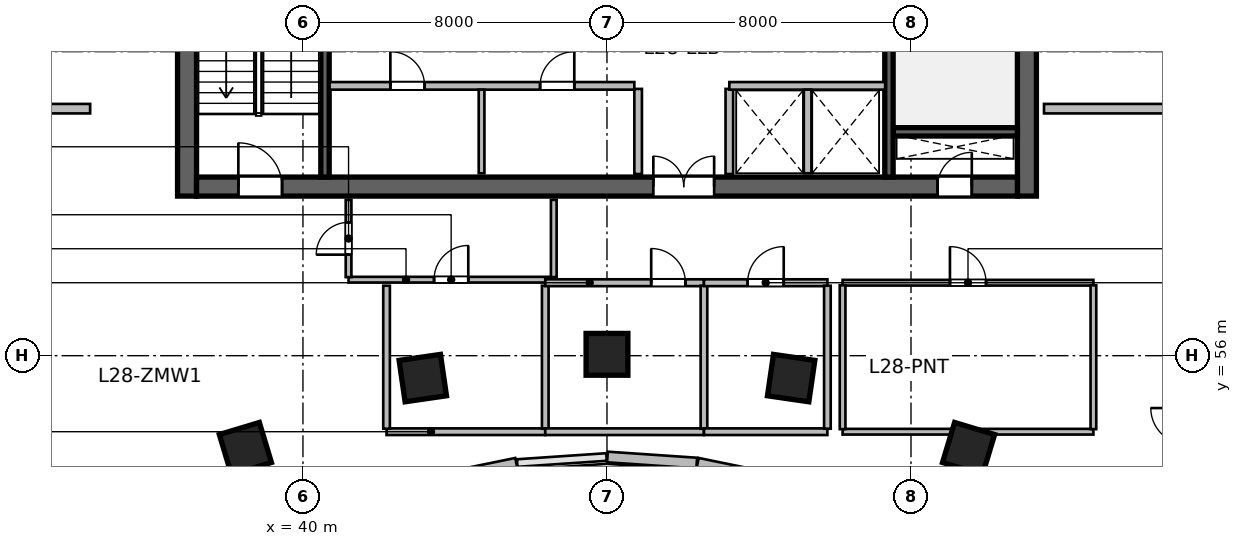
"""IFC4 building model, lengths in metres.
Left out: names, types, materials, properties, quantities, classifications, styles, units other than length and angle.
Written with IfcOpenShell. Run it as: python <this file> out.ifc"""

import sys

from ifc_helpers import new_model, si_unit, direction, frame, frame_2d, origin, origin_2d, place, context, subcontext, project, spatial, rectangle, extrude, source, transform, mapped, element, fill, save


model = new_model("IFC4")
c1 = context("Model", 3, precision=1e-05, world=origin(), true_north=direction((0.0, 1.0)))
c2 = subcontext(c1, "Body", "Model", "MODEL_VIEW")
j1 = project(units=[si_unit("LENGTHUNIT", "METRE"), si_unit("PLANEANGLEUNIT", "RADIAN")], contexts=[c1])
p1 = place(None, origin())
s1 = spatial("IfcSite", under=j1, at=p1, CompositionType="ELEMENT")
p2 = place(p1, origin())
s2 = spatial("IfcBuilding", under=s1, at=p2, CompositionType="ELEMENT")
p3 = place(p2, frame((0.0, 0.0, 119.4)))
s3 = spatial("IfcBuildingStorey", under=s2, at=p3, CompositionType="ELEMENT", Elevation=119.4)
m1 = source(origin(), c2, "Body", "SweptSolid", [
    extrude(rectangle(XDim=12.0, YDim=0.5, at=frame_2d((6.0, 0.0))), origin(), (0.0, 0.0, 1.0), 3.9),
])
for number, where, z_axis, x_axis in (
    (1, (36.95, 60.2, 0.0), (0.0, 0.0, 1.0), (0.0, 1.0, 0.0)),
    (2, (59.05, 60.2, 0.0), (0.0, 0.0, 1.0), (0.0, 1.0, 0.0)),
):
    element("IfcWall", number, at=place(p3, frame(where, z_axis=z_axis, x_axis=x_axis)), inside=s3, PredefinedType="SHEAR", context=c2, shape_type="MappedRepresentation", body=[
        mapped(m1, transform((0.0, 0.0, 0.0), scale=1.0)),
    ])
m2 = source(origin(), c2, "Body", "SweptSolid", [
    extrude(rectangle(XDim=21.6, YDim=0.5, at=frame_2d((10.8, 0.0))), origin(), (0.0, 0.0, 1.0), 3.9),
])
p4 = place(p3, frame((37.2, 60.45, 0.0), z_axis=(0.0, 0.0, 1.0), x_axis=(1.0, 0.0, 0.0)))
e3 = element("IfcWall", 3, at=p4, inside=s3, PredefinedType="SHEAR", context=c2, shape_type="MappedRepresentation", body=[
    mapped(m2, transform((0.0, 0.0, 0.0), scale=1.0)),
])
p5 = place(p4, frame((1.1, 0.0, 0.0)))
e4 = element("IfcOpeningElement", 4, at=p5, cuts=e3, PredefinedType="OPENING", context=c2, shape_type="SweptSolid", body=[
    extrude(rectangle(XDim=1.15, YDim=2.15, at=frame_2d((0.575, 1.075))), frame((0.0, 0.26, 0.0), z_axis=(0.0, -1.0, 0.0), x_axis=(1.0, 0.0, 0.0)), (0.0, 0.0, 1.0), 0.52),
])
p6 = place(p4, frame((19.5, 0.0, 0.0)))
e5 = element("IfcOpeningElement", 5, at=p6, cuts=e3, PredefinedType="OPENING", context=c2, shape_type="SweptSolid", body=[
    extrude(rectangle(XDim=0.9, YDim=2.1, at=frame_2d((0.45, 1.05))), frame((0.0, 0.26, 0.0), z_axis=(0.0, -1.0, 0.0), x_axis=(1.0, 0.0, 0.0)), (0.0, 0.0, 1.0), 0.52),
])
p7 = place(p4, frame((12.02, 0.0, 0.0)))
e6 = element("IfcOpeningElement", 6, at=p7, cuts=e3, PredefinedType="OPENING", context=c2, shape_type="SweptSolid", body=[
    extrude(rectangle(XDim=1.6, YDim=2.15, at=frame_2d((0.8, 1.075))), frame((0.0, 0.26, 0.0), z_axis=(0.0, -1.0, 0.0), x_axis=(1.0, 0.0, 0.0)), (0.0, 0.0, 1.0), 0.52),
])
m3 = source(origin(), c2, "Body", "SweptSolid", [
    extrude(rectangle(XDim=3.27, YDim=0.22, at=frame_2d((1.635, 0.0))), origin(), (0.0, 0.0, 1.0), 3.9),
])
p8 = place(p3, frame((55.53, 61.89, 0.0), z_axis=(0.0, 0.0, 1.0), x_axis=(1.0, 0.0, 0.0)))
e7 = element("IfcWall", 7, at=p8, inside=s3, PredefinedType="SHEAR", context=c2, shape_type="MappedRepresentation", body=[
    mapped(m3, transform((0.0, 0.0, 0.0), scale=1.0)),
])
m4 = source(origin(), c2, "Body", "SweptSolid", [
    extrude(rectangle(XDim=11.0, YDim=0.22, at=frame_2d((5.5, 0.0))), origin(), (0.0, 0.0, 1.0), 3.9),
])
p9 = place(p3, frame((40.58, 60.7, 0.0), z_axis=(0.0, 0.0, 1.0), x_axis=(0.0, 1.0, 0.0)))
e8 = element("IfcWall", 8, at=p9, inside=s3, PredefinedType="SHEAR", context=c2, shape_type="MappedRepresentation", body=[
    mapped(m4, transform((0.0, 0.0, 0.0), scale=1.0)),
])
p10 = place(p3, frame((55.42, 60.7, 0.0), z_axis=(0.0, 0.0, 1.0), x_axis=(0.0, 1.0, 0.0)))
e9 = element("IfcWall", 9, at=p10, inside=s3, PredefinedType="SHEAR", context=c2, shape_type="MappedRepresentation", body=[
    mapped(m4, transform((0.0, 0.0, 0.0), scale=1.0)),
])
p11 = place(p10, frame((9.545, 0.0, 0.0)))
e10 = element("IfcOpeningElement", 10, at=p11, cuts=e9, PredefinedType="OPENING", context=c2, shape_type="SweptSolid", body=[
    extrude(rectangle(XDim=1.15, YDim=2.15, at=frame_2d((0.575, 1.075))), frame((0.0, 0.12, 0.0), z_axis=(0.0, -1.0, 0.0), x_axis=(1.0, 0.0, 0.0)), (0.0, 0.0, 1.0), 0.24),
])
m5 = source(origin(), c2, "Body", "SweptSolid", [
    extrude(rectangle(XDim=1.1, YDim=1.1, at=origin_2d()), origin(), (0.0, 0.0, 1.0), 3.9),
])
for number, where, z_axis, x_axis in (
    (11, (38.485, 53.558, 0.0), (0.0, 0.0, 1.0), (-0.289, 0.957, 0.0)),
    (12, (43.154, 55.411, 0.0), (0.0, 0.0, 1.0), (-0.143, 0.99, 0.0)),
    (13, (48.0, 56.036, 0.0), (0.0, 0.0, 1.0), (0.0, 1.0, 0.0)),
    (14, (52.846, 55.411, 0.0), (0.0, 0.0, 1.0), (0.143, 0.99, 0.0)),
    (15, (57.515, 53.558, 0.0), (0.0, 0.0, 1.0), (0.289, 0.957, 0.0)),
):
    element("IfcColumn", number, at=place(p3, frame(where, z_axis=z_axis, x_axis=x_axis)), inside=s3, PredefinedType="COLUMN", context=c2, shape_type="MappedRepresentation", body=[
        mapped(m5, transform((0.0, 0.0, 0.0), scale=1.0)),
    ])
m6 = source(origin(), c2, "Body", "SweptSolid", [
    extrude(rectangle(XDim=2.374, YDim=0.28, at=frame_2d((1.187, 0.0))), origin(), (0.0, 0.0, 1.0), 3.65),
])
p12 = place(p3, frame((52.711, 52.695, 0.0), z_axis=(0.0, 0.0, 1.0), x_axis=(-0.979619827472, 0.200860632341, 0.0)))
e16 = element("IfcWall", 16, at=p12, inside=s3, PredefinedType="SOLIDWALL", context=c2, shape_type="MappedRepresentation", body=[
    mapped(m6, transform((0.0, 0.0, 0.0), scale=1.0)),
])
m7 = source(origin(), c2, "Body", "SweptSolid", [
    extrude(rectangle(XDim=2.355, YDim=0.28, at=frame_2d((1.177, 0.0))), origin(), (0.0, 0.0, 1.0), 3.65),
])
p13 = place(p3, frame((50.362, 53.175, 0.0), z_axis=(0.0, 0.0, 1.0), x_axis=(-0.997699017577, 0.067798748701, 0.0)))
e17 = element("IfcWall", 17, at=p13, inside=s3, PredefinedType="SOLIDWALL", context=c2, shape_type="MappedRepresentation", body=[
    mapped(m7, transform((0.0, 0.0, 0.0), scale=1.0)),
])
p14 = place(p3, frame((45.614, 53.172, 0.0), z_axis=(0.0, 0.0, 1.0), x_axis=(-0.979619827472, -0.200860632341, 0.0)))
e18 = element("IfcWall", 18, at=p14, inside=s3, PredefinedType="SOLIDWALL", context=c2, shape_type="MappedRepresentation", body=[
    mapped(m6, transform((0.0, 0.0, 0.0), scale=1.0)),
])
m8 = source(origin(), c2, "Body", "SweptSolid", [
    extrude(rectangle(XDim=2.24, YDim=0.2, at=frame_2d((1.12, 0.0))), origin(), (0.0, 0.0, 1.0), 3.65),
])
for number, where, z_axis, x_axis in (
    (19, (48.82, 60.78, 0.0), (0.0, 0.0, 1.0), (0.0, 1.0, 0.0)),
    (20, (51.22, 60.78, 0.0), (0.0, 0.0, 1.0), (0.0, 1.0, 0.0)),
):
    element("IfcWall", number, at=place(p3, frame(where, z_axis=z_axis, x_axis=x_axis)), inside=s3, PredefinedType="SOLIDWALL", context=c2, shape_type="MappedRepresentation", body=[
        mapped(m8, transform((0.0, 0.0, 0.0), scale=1.0)),
    ])
m9 = source(origin(), c2, "Body", "SweptSolid", [
    extrude(rectangle(XDim=8.02, YDim=0.2, at=frame_2d((4.01, 0.0))), origin(), (0.0, 0.0, 1.0), 3.65),
])
p15 = place(p3, frame((40.7, 63.1, 0.0), z_axis=(0.0, 0.0, 1.0), x_axis=(1.0, 0.0, 0.0)))
e21 = element("IfcWall", 21, at=p15, inside=s3, PredefinedType="SOLIDWALL", context=c2, shape_type="MappedRepresentation", body=[
    mapped(m9, transform((0.0, 0.0, 0.0), scale=1.0)),
])
p16 = place(p15, frame((1.6, 0.0, 0.0)))
e22 = element("IfcOpeningElement", 22, at=p16, cuts=e21, PredefinedType="OPENING", context=c2, shape_type="SweptSolid", body=[
    extrude(rectangle(XDim=0.9, YDim=2.1, at=frame_2d((0.45, 1.05))), frame((0.0, 0.11, 0.0), z_axis=(0.0, -1.0, 0.0), x_axis=(1.0, 0.0, 0.0)), (0.0, 0.0, 1.0), 0.22),
])
p17 = place(p15, frame((5.54, 0.0, 0.0)))
e23 = element("IfcOpeningElement", 23, at=p17, cuts=e21, PredefinedType="OPENING", context=c2, shape_type="SweptSolid", body=[
    extrude(rectangle(XDim=0.9, YDim=2.1, at=frame_2d((0.45, 1.05))), frame((0.0, 0.11, 0.0), z_axis=(0.0, -1.0, 0.0), x_axis=(1.0, 0.0, 0.0)), (0.0, 0.0, 1.0), 0.22),
])
m10 = source(origin(), c2, "Body", "SweptSolid", [
    extrude(rectangle(XDim=4.1, YDim=0.2, at=frame_2d((2.05, 0.0))), origin(), (0.0, 0.0, 1.0), 3.65),
])
p18 = place(p3, frame((51.22, 63.1, 0.0), z_axis=(0.0, 0.0, 1.0), x_axis=(1.0, 0.0, 0.0)))
e24 = element("IfcWall", 24, at=p18, inside=s3, PredefinedType="SOLIDWALL", context=c2, shape_type="MappedRepresentation", body=[
    mapped(m10, transform((0.0, 0.0, 0.0), scale=1.0)),
])
m11 = source(origin(), c2, "Body", "SweptSolid", [
    extrude(rectangle(XDim=2.2, YDim=0.15, at=frame_2d((1.1, 0.0))), origin(), (0.0, 0.0, 1.0), 3.65),
])
p19 = place(p3, frame((44.7, 60.8, 0.0), z_axis=(0.0, 0.0, 1.0), x_axis=(0.0, 1.0, 0.0)))
e25 = element("IfcWall", 25, at=p19, inside=s3, PredefinedType="PARTITIONING", context=c2, shape_type="MappedRepresentation", body=[
    mapped(m11, transform((0.0, 0.0, 0.0), scale=1.0)),
])
m12 = source(origin(), c2, "Body", "SweptSolid", [
    extrude(rectangle(XDim=2.2, YDim=0.2, at=frame_2d((1.1, 0.0))), origin(), (0.0, 0.0, 1.0), 3.65),
])
p20 = place(p3, frame((53.28, 60.8, 0.0), z_axis=(0.0, 0.0, 1.0), x_axis=(0.0, 1.0, 0.0)))
e26 = element("IfcWall", 26, at=p20, inside=s3, PredefinedType="SOLIDWALL", context=c2, shape_type="MappedRepresentation", body=[
    mapped(m12, transform((0.0, 0.0, 0.0), scale=1.0)),
])
m13 = source(origin(), c2, "Body", "SweptSolid", [
    extrude(rectangle(XDim=5.4, YDim=0.15, at=frame_2d((2.7, 0.0))), origin(), (0.0, 0.0, 1.0), 3.65),
])
p21 = place(p3, frame((41.2, 58.0, 0.0), z_axis=(0.0, 0.0, 1.0), x_axis=(1.0, 0.0, 0.0)))
e27 = element("IfcWall", 27, at=p21, inside=s3, PredefinedType="PARTITIONING", context=c2, shape_type="MappedRepresentation", body=[
    mapped(m13, transform((0.0, 0.0, 0.0), scale=1.0)),
])
p22 = place(p21, frame((2.25, 0.0, 0.0)))
e28 = element("IfcOpeningElement", 28, at=p22, cuts=e27, PredefinedType="OPENING", context=c2, shape_type="SweptSolid", body=[
    extrude(rectangle(XDim=0.9, YDim=2.08, at=frame_2d((0.45, 1.04))), frame((0.0, 0.085, 0.0), z_axis=(0.0, -1.0, 0.0), x_axis=(1.0, 0.0, 0.0)), (0.0, 0.0, 1.0), 0.17),
])
m14 = source(origin(), c2, "Body", "SweptSolid", [
    extrude(rectangle(XDim=2.033, YDim=0.15, at=frame_2d((1.016, 0.0))), origin(), (0.0, 0.0, 1.0), 3.65),
])
p23 = place(p3, frame((41.2, 58.067, 0.0), z_axis=(0.0, 0.0, 1.0), x_axis=(0.0, 1.0, 0.0)))
e29 = element("IfcWall", 29, at=p23, inside=s3, PredefinedType="PARTITIONING", context=c2, shape_type="MappedRepresentation", body=[
    mapped(m14, transform((0.0, 0.0, 0.0), scale=1.0)),
])
p24 = place(p23, frame((0.591, 0.0, 0.0)))
e30 = element("IfcOpeningElement", 30, at=p24, cuts=e29, PredefinedType="OPENING", context=c2, shape_type="SweptSolid", body=[
    extrude(rectangle(XDim=0.85, YDim=2.1, at=frame_2d((0.425, 1.05))), frame((0.0, 0.085, 0.0), z_axis=(0.0, -1.0, 0.0), x_axis=(1.0, 0.0, 0.0)), (0.0, 0.0, 1.0), 0.17),
])
p25 = place(p3, frame((46.6, 58.067, 0.0), z_axis=(0.0, 0.0, 1.0), x_axis=(0.0, 1.0, 0.0)))
e31 = element("IfcWall", 31, at=p25, inside=s3, PredefinedType="PARTITIONING", context=c2, shape_type="MappedRepresentation", body=[
    mapped(m14, transform((0.0, 0.0, 0.0), scale=1.0)),
])
m15 = source(origin(), c2, "Body", "SweptSolid", [
    extrude(rectangle(XDim=4.176, YDim=0.175, at=frame_2d((2.088, 0.0))), origin(), (0.0, 0.0, 1.0), 3.65),
])
p26 = place(p3, frame((42.2, 54.0, 0.0), z_axis=(0.0, 0.0, 1.0), x_axis=(1.0, 0.0, 0.0)))
e32 = element("IfcWall", 32, at=p26, inside=s3, PredefinedType="PARTITIONING", context=c2, shape_type="MappedRepresentation", body=[
    mapped(m15, transform((0.0, 0.0, 0.0), scale=1.0)),
])
m16 = source(origin(), c2, "Body", "SweptSolid", [
    extrude(rectangle(XDim=3.763, YDim=0.175, at=frame_2d((1.881, 0.0))), origin(), (0.0, 0.0, 1.0), 3.65),
])
for number, where, z_axis, x_axis in (
    (33, (42.2, 54.079, 0.0), (0.0, 0.0, 1.0), (0.0, 1.0, 0.0)),
    (34, (46.376, 54.079, 0.0), (0.0, 0.0, 1.0), (0.0, 1.0, 0.0)),
):
    element("IfcWall", number, at=place(p3, frame(where, z_axis=z_axis, x_axis=x_axis)), inside=s3, PredefinedType="PARTITIONING", context=c2, shape_type="MappedRepresentation", body=[
        mapped(m16, transform((0.0, 0.0, 0.0), scale=1.0)),
    ])
p27 = place(p3, frame((46.376, 54.0, 0.0), z_axis=(0.0, 0.0, 1.0), x_axis=(1.0, 0.0, 0.0)))
e35 = element("IfcWall", 35, at=p27, inside=s3, PredefinedType="PARTITIONING", context=c2, shape_type="MappedRepresentation", body=[
    mapped(m15, transform((0.0, 0.0, 0.0), scale=1.0)),
])
m17 = source(origin(), c2, "Body", "SweptSolid", [
    extrude(rectangle(XDim=4.176, YDim=0.18, at=frame_2d((2.088, 0.0))), origin(), (0.0, 0.0, 1.0), 3.65),
])
p28 = place(p3, frame((46.376, 57.92, 0.0), z_axis=(0.0, 0.0, 1.0), x_axis=(1.0, 0.0, 0.0)))
e36 = element("IfcWall", 36, at=p28, inside=s3, PredefinedType="PLUMBINGWALL", context=c2, shape_type="MappedRepresentation", body=[
    mapped(m17, transform((0.0, 0.0, 0.0), scale=1.0)),
])
p29 = place(p28, frame((2.788, 0.0, 0.0)))
e37 = element("IfcOpeningElement", 37, at=p29, cuts=e36, PredefinedType="OPENING", context=c2, shape_type="SweptSolid", body=[
    extrude(rectangle(XDim=0.9, YDim=2.08, at=frame_2d((0.45, 1.04))), frame((0.0, 0.1, 0.0), z_axis=(0.0, -1.0, 0.0), x_axis=(1.0, 0.0, 0.0)), (0.0, 0.0, 1.0), 0.2),
])
p30 = place(p3, frame((50.552, 54.079, 0.0), z_axis=(0.0, 0.0, 1.0), x_axis=(0.0, 1.0, 0.0)))
e38 = element("IfcWall", 38, at=p30, inside=s3, PredefinedType="PARTITIONING", context=c2, shape_type="MappedRepresentation", body=[
    mapped(m16, transform((0.0, 0.0, 0.0), scale=1.0)),
])
m18 = source(origin(), c2, "Body", "SweptSolid", [
    extrude(rectangle(XDim=3.248, YDim=0.175, at=frame_2d((1.624, 0.0))), origin(), (0.0, 0.0, 1.0), 3.65),
])
p31 = place(p3, frame((50.552, 54.0, 0.0), z_axis=(0.0, 0.0, 1.0), x_axis=(1.0, 0.0, 0.0)))
e39 = element("IfcWall", 39, at=p31, inside=s3, PredefinedType="PARTITIONING", context=c2, shape_type="MappedRepresentation", body=[
    mapped(m18, transform((0.0, 0.0, 0.0), scale=1.0)),
])
m19 = source(origin(), c2, "Body", "SweptSolid", [
    extrude(rectangle(XDim=3.248, YDim=0.18, at=frame_2d((1.624, 0.0))), origin(), (0.0, 0.0, 1.0), 3.65),
])
p32 = place(p3, frame((50.552, 57.92, 0.0), z_axis=(0.0, 0.0, 1.0), x_axis=(1.0, 0.0, 0.0)))
e40 = element("IfcWall", 40, at=p32, inside=s3, PredefinedType="PLUMBINGWALL", context=c2, shape_type="MappedRepresentation", body=[
    mapped(m19, transform((0.0, 0.0, 0.0), scale=1.0)),
])
p33 = place(p32, frame((1.149, 0.0, 0.0)))
e41 = element("IfcOpeningElement", 41, at=p33, cuts=e40, PredefinedType="OPENING", context=c2, shape_type="SweptSolid", body=[
    extrude(rectangle(XDim=0.95, YDim=2.12, at=frame_2d((0.475, 1.06))), frame((0.0, 0.1, 0.0), z_axis=(0.0, -1.0, 0.0), x_axis=(1.0, 0.0, 0.0)), (0.0, 0.0, 1.0), 0.2),
])
p34 = place(p3, frame((53.8, 54.079, 0.0), z_axis=(0.0, 0.0, 1.0), x_axis=(0.0, 1.0, 0.0)))
e42 = element("IfcWall", 42, at=p34, inside=s3, PredefinedType="PARTITIONING", context=c2, shape_type="MappedRepresentation", body=[
    mapped(m16, transform((0.0, 0.0, 0.0), scale=1.0)),
])
m20 = source(origin(), c2, "Body", "SweptSolid", [
    extrude(rectangle(XDim=6.6, YDim=0.15, at=frame_2d((3.3, 0.0))), origin(), (0.0, 0.0, 1.0), 3.095),
])
p35 = place(p3, frame((54.2, 54.0, 0.0), z_axis=(0.0, 0.0, 1.0), x_axis=(1.0, 0.0, 0.0)))
e43 = element("IfcWall", 43, at=p35, inside=s3, PredefinedType="PARTITIONING", context=c2, shape_type="MappedRepresentation", body=[
    mapped(m20, transform((0.0, 0.0, 0.0), scale=1.0)),
])
m21 = source(origin(), c2, "Body", "SweptSolid", [
    extrude(rectangle(XDim=6.6, YDim=0.15, at=frame_2d((3.3, 0.0))), origin(), (0.0, 0.0, 1.0), 3.65),
])
p36 = place(p3, frame((54.2, 57.92, 0.0), z_axis=(0.0, 0.0, 1.0), x_axis=(1.0, 0.0, 0.0)))
e44 = element("IfcWall", 44, at=p36, inside=s3, PredefinedType="PARTITIONING", context=c2, shape_type="MappedRepresentation", body=[
    mapped(m21, transform((0.0, 0.0, 0.0), scale=1.0)),
])
p37 = place(p36, frame((2.825, 0.0, 0.0)))
e45 = element("IfcOpeningElement", 45, at=p37, cuts=e44, PredefinedType="OPENING", context=c2, shape_type="SweptSolid", body=[
    extrude(rectangle(XDim=0.95, YDim=2.1, at=frame_2d((0.475, 1.05))), frame((0.0, 0.085, 0.0), z_axis=(0.0, -1.0, 0.0), x_axis=(1.0, 0.0, 0.0)), (0.0, 0.0, 1.0), 0.17),
])
m22 = source(origin(), c2, "Body", "SweptSolid", [
    extrude(rectangle(XDim=3.785, YDim=0.15, at=frame_2d((1.893, 0.0))), origin(), (0.0, 0.0, 1.0), 3.65),
])
for number, where, z_axis, x_axis in (
    (46, (54.2, 54.067, 0.0), (0.0, 0.0, 1.0), (0.0, 1.0, 0.0)),
    (47, (60.8, 54.067, 0.0), (0.0, 0.0, 1.0), (0.0, 1.0, 0.0)),
):
    element("IfcWall", number, at=place(p3, frame(where, z_axis=z_axis, x_axis=x_axis)), inside=s3, PredefinedType="PARTITIONING", context=c2, shape_type="MappedRepresentation", body=[
        mapped(m22, transform((0.0, 0.0, 0.0), scale=1.0)),
    ])
m23 = source(origin(), c2, "Body", "SweptSolid", [
    extrude(rectangle(XDim=1.66, YDim=0.25, at=frame_2d((0.83, 0.0))), origin(), (0.0, 0.0, 1.0), 3.65),
])
p38 = place(p3, frame((32.74, 62.5, 0.0), z_axis=(0.0, 0.0, 1.0), x_axis=(1.0, 0.0, 0.0)))
e48 = element("IfcWall", 48, at=p38, inside=s3, PredefinedType="PARTITIONING", context=c2, shape_type="MappedRepresentation", body=[
    mapped(m23, transform((0.0, 0.0, 0.0), scale=1.0)),
])
m24 = source(origin(), c2, "Body", "SweptSolid", [
    extrude(rectangle(XDim=3.76, YDim=0.25, at=frame_2d((1.88, 0.0))), origin(), (0.0, 0.0, 1.0), 3.65),
])
p39 = place(p3, frame((59.5, 62.5, 0.0), z_axis=(0.0, 0.0, 1.0), x_axis=(1.0, 0.0, 0.0)))
e49 = element("IfcWall", 49, at=p39, inside=s3, PredefinedType="PARTITIONING", context=c2, shape_type="MappedRepresentation", body=[
    mapped(m24, transform((0.0, 0.0, 0.0), scale=1.0)),
])
m25 = source(origin(), c2, "Body", "SweptSolid", [
    extrude(rectangle(XDim=1.15, YDim=2.15, at=frame_2d((0.575, 1.075))), frame((0.0, 0.025, 0.0), z_axis=(0.0, -1.0, 0.0), x_axis=(1.0, 0.0, 0.0)), (0.0, 0.0, 1.0), 0.05),
])
p40 = place(p5, origin())
e50 = element("IfcDoor", 50, at=p40, inside=s3, OperationType="SINGLE_SWING_LEFT", PredefinedType="DOOR", context=c2, shape_type="MappedRepresentation", body=[
    mapped(m25, transform((0.0, 0.0, 0.0), scale=1.0)),
])
fill(e4, e50)
m26 = source(origin(), c2, "Body", "SweptSolid", [
    extrude(rectangle(XDim=0.9, YDim=2.1, at=frame_2d((0.45, 1.05))), frame((0.0, 0.025, 0.0), z_axis=(0.0, -1.0, 0.0), x_axis=(1.0, 0.0, 0.0)), (0.0, 0.0, 1.0), 0.05),
])
p41 = place(p6, origin())
e51 = element("IfcDoor", 51, at=p41, inside=s3, OperationType="SINGLE_SWING_RIGHT", PredefinedType="DOOR", context=c2, shape_type="MappedRepresentation", body=[
    mapped(m26, transform((0.0, 0.0, 0.0), scale=1.0)),
])
fill(e5, e51)
m27 = source(origin(), c2, "Body", "SweptSolid", [
    extrude(rectangle(XDim=1.6, YDim=2.15, at=frame_2d((0.8, 1.075))), frame((0.0, 0.025, 0.0), z_axis=(0.0, -1.0, 0.0), x_axis=(1.0, 0.0, 0.0)), (0.0, 0.0, 1.0), 0.05),
])
p42 = place(p7, origin())
e52 = element("IfcDoor", 52, at=p42, inside=s3, OperationType="DOUBLE_DOOR_SINGLE_SWING", PredefinedType="DOOR", context=c2, shape_type="MappedRepresentation", body=[
    mapped(m27, transform((0.0, 0.0, 0.0), scale=1.0)),
])
fill(e6, e52)
p43 = place(p16, origin())
e53 = element("IfcDoor", 53, at=p43, inside=s3, OperationType="SINGLE_SWING_LEFT", PredefinedType="DOOR", context=c2, shape_type="MappedRepresentation", body=[
    mapped(m26, transform((0.0, 0.0, 0.0), scale=1.0)),
])
fill(e22, e53)
p44 = place(p17, origin())
e54 = element("IfcDoor", 54, at=p44, inside=s3, OperationType="SINGLE_SWING_RIGHT", PredefinedType="DOOR", context=c2, shape_type="MappedRepresentation", body=[
    mapped(m26, transform((0.0, 0.0, 0.0), scale=1.0)),
])
fill(e23, e54)
m28 = source(origin(), c2, "Body", "SweptSolid", [
    extrude(rectangle(XDim=0.85, YDim=2.1, at=frame_2d((0.425, 1.05))), frame((0.0, 0.025, 0.0), z_axis=(0.0, -1.0, 0.0), x_axis=(1.0, 0.0, 0.0)), (0.0, 0.0, 1.0), 0.05),
])
p45 = place(p24, origin())
e55 = element("IfcDoor", 55, at=p45, inside=s3, OperationType="SINGLE_SWING_LEFT", PredefinedType="DOOR", context=c2, shape_type="MappedRepresentation", body=[
    mapped(m28, transform((0.0, 0.0, 0.0), scale=1.0)),
])
fill(e30, e55)
m29 = source(origin(), c2, "Body", "SweptSolid", [
    extrude(rectangle(XDim=0.9, YDim=2.08, at=frame_2d((0.45, 1.04))), frame((0.0, 0.025, 0.0), z_axis=(0.0, -1.0, 0.0), x_axis=(1.0, 0.0, 0.0)), (0.0, 0.0, 1.0), 0.05),
])
p46 = place(p22, origin())
e56 = element("IfcDoor", 56, at=p46, inside=s3, OperationType="SINGLE_SWING_RIGHT", PredefinedType="DOOR", context=c2, shape_type="MappedRepresentation", body=[
    mapped(m29, transform((0.0, 0.0, 0.0), scale=1.0)),
])
fill(e28, e56)
p47 = place(p29, origin())
e57 = element("IfcDoor", 57, at=p47, inside=s3, OperationType="SINGLE_SWING_LEFT", PredefinedType="DOOR", context=c2, shape_type="MappedRepresentation", body=[
    mapped(m29, transform((0.0, 0.0, 0.0), scale=1.0)),
])
fill(e37, e57)
m30 = source(origin(), c2, "Body", "SweptSolid", [
    extrude(rectangle(XDim=0.95, YDim=2.12, at=frame_2d((0.475, 1.06))), frame((0.0, 0.025, 0.0), z_axis=(0.0, -1.0, 0.0), x_axis=(1.0, 0.0, 0.0)), (0.0, 0.0, 1.0), 0.05),
])
p48 = place(p33, origin())
e58 = element("IfcDoor", 58, at=p48, inside=s3, OperationType="SINGLE_SWING_RIGHT", PredefinedType="DOOR", context=c2, shape_type="MappedRepresentation", body=[
    mapped(m30, transform((0.0, 0.0, 0.0), scale=1.0)),
])
fill(e41, e58)
m31 = source(origin(), c2, "Body", "SweptSolid", [
    extrude(rectangle(XDim=0.95, YDim=2.1, at=frame_2d((0.475, 1.05))), frame((0.0, 0.025, 0.0), z_axis=(0.0, -1.0, 0.0), x_axis=(1.0, 0.0, 0.0)), (0.0, 0.0, 1.0), 0.05),
])
p49 = place(p37, origin())
e59 = element("IfcDoor", 59, at=p49, inside=s3, OperationType="SINGLE_SWING_LEFT", PredefinedType="DOOR", context=c2, shape_type="MappedRepresentation", body=[
    mapped(m31, transform((0.0, 0.0, 0.0), scale=1.0)),
])
fill(e45, e59)
save(model, sys.argv[1])
